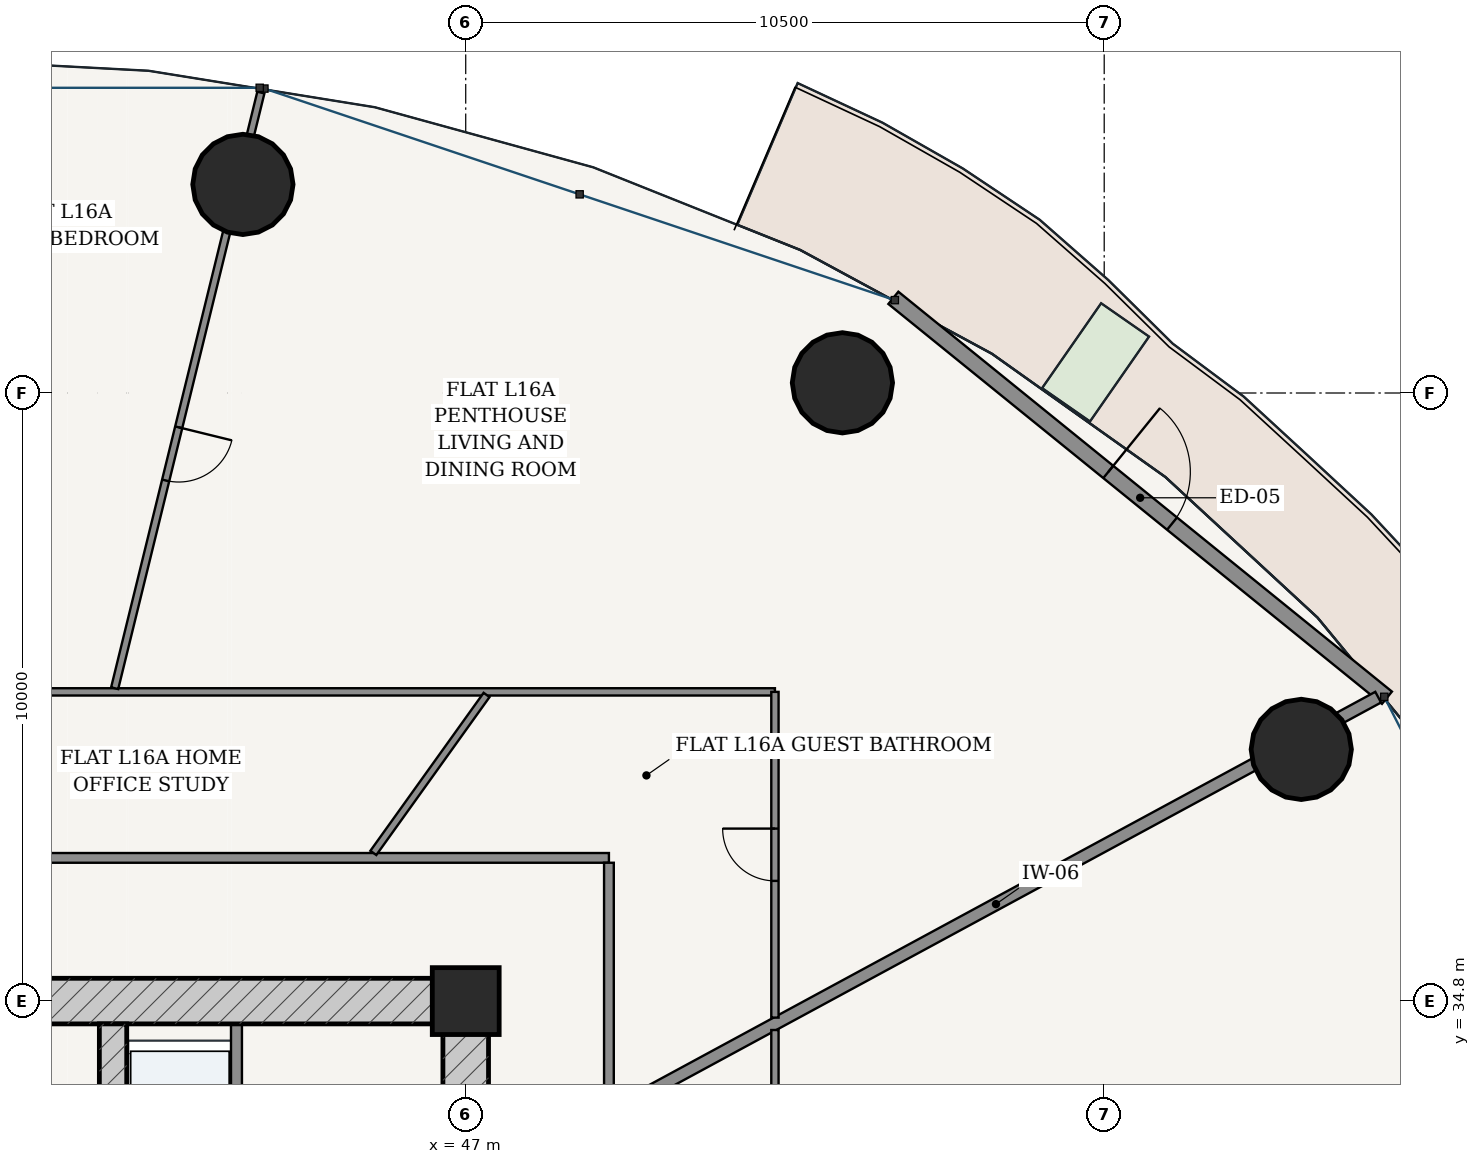
"""IFC4 building model, lengths in metres.
Left out: names, types, materials, properties, quantities, classifications, styles, units other than length and angle.
Written with IfcOpenShell. Run it as: python <this file> out.ifc"""

import sys

from ifc_helpers import new_model, si_unit, direction, frame, frame_2d, origin, origin_2d, place, context, subcontext, project, spatial, rectangle, hollow_circle, extrude, source, transform, mapped, element, fill, save


model = new_model("IFC4")
c1 = context("Model", 3, precision=1e-05, world=origin(), true_north=direction((-0.2419218956, 0.970295726276)))
c2 = subcontext(c1, "Body", "Model", "MODEL_VIEW")
j1 = project(units=[si_unit("LENGTHUNIT", "METRE"), si_unit("PLANEANGLEUNIT", "RADIAN")], contexts=[c1])
p1 = place(None, origin())
s1 = spatial("IfcSite", under=j1, at=p1, CompositionType="ELEMENT")
p2 = place(p1, origin())
s2 = spatial("IfcBuilding", under=s1, at=p2, CompositionType="ELEMENT")
p3 = place(p2, frame((0.0, 0.0, 63.6)))
s3 = spatial("IfcBuildingStorey", under=s2, at=p3, CompositionType="ELEMENT", Elevation=63.6)
p4 = place(p3, frame((47.0, 34.8, 0.0), z_axis=(0.0, 0.0, 1.0), x_axis=(1.0, 0.0, 0.0)))
e1 = element("IfcColumn", 1, at=p4, inside=s3, PredefinedType="COLUMN", context=c2, shape_type="SweptSolid", body=[
    extrude(rectangle(XDim=1.1, YDim=1.1, at=origin_2d()), origin(), (0.0, 0.0, 1.0), 3.6),
])
p5 = place(p3, frame((28.625, 34.8, 0.0), z_axis=(0.0, 0.0, 1.0), x_axis=(1.0, 0.0, 0.0)))
e2 = element("IfcWall", 2, at=p5, inside=s3, PredefinedType="SHEAR", context=c2, shape_type="SweptSolid", body=[
    extrude(rectangle(XDim=18.75, YDim=0.75, at=frame_2d((9.375, 0.0))), origin(), (0.0, 0.0, 1.0), 3.32),
])
p6 = place(p5, frame((8.95, 0.0, 0.0)))
e3 = element("IfcOpeningElement", 3, at=p6, cuts=e2, PredefinedType="OPENING", context=c2, shape_type="SweptSolid", body=[
    extrude(rectangle(XDim=0.85, YDim=2.1, at=frame_2d((0.425, 1.05))), frame((0.0, 0.385, 0.0), z_axis=(0.0, -1.0, 0.0), x_axis=(1.0, 0.0, 0.0)), (0.0, 0.0, 1.0), 0.77),
])
p7 = place(p3, frame((47.0, 19.175, 0.0), z_axis=(0.0, 0.0, 1.0), x_axis=(0.0, 1.0, 0.0)))
e4 = element("IfcWall", 4, at=p7, inside=s3, PredefinedType="SHEAR", context=c2, shape_type="SweptSolid", body=[
    extrude(rectangle(XDim=15.25, YDim=0.75, at=frame_2d((7.625, 0.0))), origin(), (0.0, 0.0, 1.0), 3.32),
])
p8 = place(p7, frame((9.875, 0.0, 0.0)))
e5 = element("IfcOpeningElement", 5, at=p8, cuts=e4, PredefinedType="OPENING", context=c2, shape_type="SweptSolid", body=[
    extrude(rectangle(XDim=1.5, YDim=2.2, at=frame_2d((0.75, 1.1))), frame((0.0, 0.385, 0.0), z_axis=(0.0, -1.0, 0.0), x_axis=(1.0, 0.0, 0.0)), (0.0, 0.0, 1.0), 0.77),
])
p9 = place(p3, frame((41.2, 19.175, 0.0), z_axis=(0.0, 0.0, 1.0), x_axis=(0.0, 1.0, 0.0)))
e6 = element("IfcWall", 6, at=p9, inside=s3, PredefinedType="SHEAR", context=c2, shape_type="SweptSolid", body=[
    extrude(rectangle(XDim=15.25, YDim=0.45, at=frame_2d((7.625, 0.0))), origin(), (0.0, 0.0, 1.0), 3.32),
])
p10 = place(p9, frame((7.8, 0.0, 0.0)))
e7 = element("IfcOpeningElement", 7, at=p10, cuts=e6, PredefinedType="OPENING", context=c2, shape_type="SweptSolid", body=[
    extrude(rectangle(XDim=1.05, YDim=2.15, at=frame_2d((0.525, 1.075))), frame((0.0, 0.235, 0.0), z_axis=(0.0, -1.0, 0.0), x_axis=(1.0, 0.0, 0.0)), (0.0, 0.0, 1.0), 0.47),
])
for number, where, z_axis, x_axis in (
    (8, (60.741, 38.939, 0.0), (0.0, 0.0, 1.0), (1.0, 0.0, 0.0)),
    (9, (53.195, 44.968, 0.0), (0.0, 0.0, 1.0), (1.0, 0.0, 0.0)),
    (10, (43.336, 48.23, 0.0), (0.0, 0.0, 1.0), (1.0, 0.0, 0.0)),
):
    element("IfcColumn", number, at=place(p3, frame(where, z_axis=z_axis, x_axis=x_axis)), inside=s3, PredefinedType="COLUMN", context=c2, shape_type="SweptSolid", body=[
        extrude(hollow_circle(Radius=0.825, WallThickness=0.05, at=origin_2d()), origin(), (0.0, 0.0, 1.0), 3.6),
    ])
p11 = place(p3, frame((62.15, 39.789, 0.0), z_axis=(0.0, 0.0, 1.0), x_axis=(-0.777005352078, 0.62949398952, 0.0)))
e11 = element("IfcWall", 11, at=p11, inside=s3, PredefinedType="SOLIDWALL", context=c2, shape_type="SweptSolid", body=[
    extrude(rectangle(XDim=10.447, YDim=0.26, at=frame_2d((5.223, 0.0))), origin(), (0.0, 0.0, 1.0), 3.32),
])
p12 = place(p11, frame((4.548, 0.0, 0.0)))
e12 = element("IfcOpeningElement", 12, at=p12, cuts=e11, PredefinedType="OPENING", context=c2, shape_type="SweptSolid", body=[
    extrude(rectangle(XDim=1.35, YDim=2.2, at=frame_2d((0.675, 1.1))), frame((0.0, 0.14, 0.0), z_axis=(0.0, -1.0, 0.0), x_axis=(1.0, 0.0, 0.0)), (0.0, 0.0, 1.0), 0.28),
])
p13 = place(p3, frame((43.23, 28.52, 0.0), z_axis=(0.0, 0.0, 1.0), x_axis=(0.0, 1.0, 0.0)))
e13 = element("IfcWall", 13, at=p13, inside=s3, PredefinedType="PARTITIONING", context=c2, shape_type="SweptSolid", body=[
    extrude(rectangle(XDim=5.905, YDim=0.18, at=frame_2d((2.953, 0.0))), origin(), (0.0, 0.0, 1.0), 3.32),
])
p14 = place(p13, frame((0.905, 0.0, 0.0)))
e14 = element("IfcOpeningElement", 14, at=p14, cuts=e13, PredefinedType="OPENING", context=c2, shape_type="SweptSolid", body=[
    extrude(rectangle(XDim=0.85, YDim=2.1, at=frame_2d((0.425, 1.05))), frame((0.0, 0.1, 0.0), z_axis=(0.0, -1.0, 0.0), x_axis=(1.0, 0.0, 0.0)), (0.0, 0.0, 1.0), 0.2),
])
p15 = place(p13, frame((3.655, 0.0, 0.0)))
e15 = element("IfcOpeningElement", 15, at=p15, cuts=e13, PredefinedType="OPENING", context=c2, shape_type="SweptSolid", body=[
    extrude(rectangle(XDim=1.15, YDim=2.2, at=frame_2d((0.575, 1.1))), frame((0.0, 0.1, 0.0), z_axis=(0.0, -1.0, 0.0), x_axis=(1.0, 0.0, 0.0)), (0.0, 0.0, 1.0), 0.2),
])
p16 = place(p3, frame((26.645, 37.155, 0.0), z_axis=(0.0, 0.0, 1.0), x_axis=(1.0, 0.0, 0.0)))
e16 = element("IfcWall", 16, at=p16, inside=s3, PredefinedType="PARTITIONING", context=c2, shape_type="SweptSolid", body=[
    extrude(rectangle(XDim=22.71, YDim=0.16, at=frame_2d((11.355, 0.0))), origin(), (0.0, 0.0, 1.0), 2.688),
])
p17 = place(p3, frame((49.355, 16.525, 0.0), z_axis=(0.0, 0.0, 1.0), x_axis=(0.0, 1.0, 0.0)))
e17 = element("IfcWall", 17, at=p17, inside=s3, PredefinedType="PARTITIONING", context=c2, shape_type="SweptSolid", body=[
    extrude(rectangle(XDim=20.55, YDim=0.16, at=frame_2d((10.275, 0.0))), origin(), (0.0, 0.0, 1.0), 2.688),
])
p18 = place(p17, frame((2.733, 0.0, 0.0)))
e18 = element("IfcOpeningElement", 18, at=p18, cuts=e17, PredefinedType="OPENING", context=c2, shape_type="SweptSolid", body=[
    extrude(rectangle(XDim=0.98, YDim=2.2, at=frame_2d((0.49, 1.1))), frame((0.0, 0.09, 0.0), z_axis=(0.0, -1.0, 0.0), x_axis=(1.0, 0.0, 0.0)), (0.0, 0.0, 1.0), 0.18),
])
p19 = place(p3, frame((49.435, 32.991, 0.0), z_axis=(0.0, 0.0, 1.0), x_axis=(0.879369737803, 0.476139542819, 0.0)))
e19 = element("IfcWall", 19, at=p19, inside=s3, PredefinedType="PARTITIONING", context=c2, shape_type="SweptSolid", body=[
    extrude(rectangle(XDim=14.295, YDim=0.2, at=frame_2d((7.147, 0.0))), origin(), (0.0, 0.0, 1.0), 2.688),
])
p20 = place(p3, frame((23.915, 39.885, 0.0), z_axis=(0.0, 0.0, 1.0), x_axis=(1.0, 0.0, 0.0)))
e20 = element("IfcWall", 20, at=p20, inside=s3, PredefinedType="PARTITIONING", context=c2, shape_type="SweptSolid", body=[
    extrude(rectangle(XDim=28.17, YDim=0.12, at=frame_2d((14.085, 0.0))), origin(), (0.0, 0.0, 1.0), 2.688),
])
p21 = place(p20, frame((12.891, 0.0, 0.0)))
e21 = element("IfcOpeningElement", 21, at=p21, cuts=e20, PredefinedType="OPENING", context=c2, shape_type="SweptSolid", body=[
    extrude(rectangle(XDim=0.9, YDim=2.15, at=frame_2d((0.45, 1.075))), frame((0.0, 0.07, 0.0), z_axis=(0.0, -1.0, 0.0), x_axis=(1.0, 0.0, 0.0)), (0.0, 0.0, 1.0), 0.14),
])
p22 = place(p3, frame((52.085, 39.885, 0.0), z_axis=(0.0, 0.0, 1.0), x_axis=(0.0, -1.0, 0.0)))
e22 = element("IfcWall", 22, at=p22, inside=s3, PredefinedType="PARTITIONING", context=c2, shape_type="SweptSolid", body=[
    extrude(rectangle(XDim=5.357, YDim=0.12, at=frame_2d((2.678, 0.0))), origin(), (0.0, 0.0, 1.0), 2.999),
])
p23 = place(p22, frame((2.248, 0.0, 0.0)))
e23 = element("IfcOpeningElement", 23, at=p23, cuts=e22, PredefinedType="OPENING", context=c2, shape_type="SweptSolid", body=[
    extrude(rectangle(XDim=0.86, YDim=2.15, at=frame_2d((0.43, 1.075))), frame((0.0, 0.07, 0.0), z_axis=(0.0, -1.0, 0.0), x_axis=(1.0, 0.0, 0.0)), (0.0, 0.0, 1.0), 0.14),
])
p24 = place(p3, frame((41.227, 39.945, 0.0), z_axis=(0.0, 0.0, 1.0), x_axis=(0.238375747469, 0.97117300365, 0.0)))
e24 = element("IfcWall", 24, at=p24, inside=s3, PredefinedType="PARTITIONING", context=c2, shape_type="SweptSolid", body=[
    extrude(rectangle(XDim=10.086, YDim=0.12, at=frame_2d((5.043, 0.0))), origin(), (0.0, 0.0, 1.0), 2.688),
])
p25 = place(p24, frame((3.518, 0.0, 0.0)))
e25 = element("IfcOpeningElement", 25, at=p25, cuts=e24, PredefinedType="OPENING", context=c2, shape_type="SweptSolid", body=[
    extrude(rectangle(XDim=0.9, YDim=2.15, at=frame_2d((0.45, 1.075))), frame((0.0, 0.07, 0.0), z_axis=(0.0, -1.0, 0.0), x_axis=(1.0, 0.0, 0.0)), (0.0, 0.0, 1.0), 0.14),
])
p26 = place(p3, frame((45.481, 37.237, 0.0), z_axis=(0.0, 0.0, 1.0), x_axis=(0.582530715463, 0.812808689387, 0.0)))
e26 = element("IfcWall", 26, at=p26, inside=s3, PredefinedType="PARTITIONING", context=c2, shape_type="SweptSolid", body=[
    extrude(rectangle(XDim=3.197, YDim=0.12, at=frame_2d((1.598, 0.0))), origin(), (0.0, 0.0, 1.0), 3.32),
])
p27 = place(p3, frame((52.085, 34.324, 0.0), z_axis=(0.0, 0.0, 1.0), x_axis=(0.0, -1.0, 0.0)))
e27 = element("IfcWall", 27, at=p27, inside=s3, PredefinedType="PARTITIONING", context=c2, shape_type="SweptSolid", body=[
    extrude(rectangle(XDim=20.609, YDim=0.12, at=frame_2d((10.305, 0.0))), origin(), (0.0, 0.0, 1.0), 2.688),
])
p28 = place(p27, frame((15.972, 0.0, 0.0)))
e28 = element("IfcOpeningElement", 28, at=p28, cuts=e27, PredefinedType="OPENING", context=c2, shape_type="SweptSolid", body=[
    extrude(rectangle(XDim=0.9, YDim=2.15, at=frame_2d((0.45, 1.075))), frame((0.0, 0.07, 0.0), z_axis=(0.0, -1.0, 0.0), x_axis=(1.0, 0.0, 0.0)), (0.0, 0.0, 1.0), 0.14),
])
p29 = place(p27, frame((3.058, 0.0, 0.0)))
e29 = element("IfcOpeningElement", 29, at=p29, cuts=e27, PredefinedType="OPENING", context=c2, shape_type="SweptSolid", body=[
    extrude(rectangle(XDim=0.9, YDim=2.15, at=frame_2d((0.45, 1.075))), frame((0.0, 0.07, 0.0), z_axis=(0.0, -1.0, 0.0), x_axis=(1.0, 0.0, 0.0)), (0.0, 0.0, 1.0), 0.14),
])
m1 = source(origin(), c2, "Body", "SweptSolid", [
    extrude(rectangle(XDim=1.35, YDim=2.2, at=frame_2d((0.675, 1.1))), frame((0.0, 0.025, 0.0), z_axis=(0.0, -1.0, 0.0), x_axis=(1.0, 0.0, 0.0)), (0.0, 0.0, 1.0), 0.05),
])
p30 = place(p12, frame((1.35, 0.0, 0.0), z_axis=(0.0, 0.0, 1.0), x_axis=(-1.0, 0.0, 0.0)))
e30 = element("IfcDoor", 30, at=p30, inside=s3, OperationType="SINGLE_SWING_LEFT", PredefinedType="DOOR", context=c2, shape_type="MappedRepresentation", body=[
    mapped(m1, transform((0.0, 0.0, 0.0), scale=1.0)),
])
fill(e12, e30)
m2 = source(origin(), c2, "Body", "SweptSolid", [
    extrude(rectangle(XDim=0.9, YDim=2.15, at=frame_2d((0.45, 1.075))), frame((0.0, 0.025, 0.0), z_axis=(0.0, -1.0, 0.0), x_axis=(1.0, 0.0, 0.0)), (0.0, 0.0, 1.0), 0.05),
])
p31 = place(p25, frame((0.9, 0.0, 0.0), z_axis=(0.0, 0.0, 1.0), x_axis=(-1.0, 0.0, 0.0)))
e31 = element("IfcDoor", 31, at=p31, inside=s3, OperationType="SINGLE_SWING_LEFT", PredefinedType="DOOR", context=c2, shape_type="MappedRepresentation", body=[
    mapped(m2, transform((0.0, 0.0, 0.0), scale=1.0)),
])
fill(e25, e31)
m3 = source(origin(), c2, "Body", "SweptSolid", [
    extrude(rectangle(XDim=0.86, YDim=2.15, at=frame_2d((0.43, 1.075))), frame((0.0, 0.025, 0.0), z_axis=(0.0, -1.0, 0.0), x_axis=(1.0, 0.0, 0.0)), (0.0, 0.0, 1.0), 0.05),
])
p32 = place(p23, frame((0.86, 0.0, 0.0), z_axis=(0.0, 0.0, 1.0), x_axis=(-1.0, 0.0, 0.0)))
e32 = element("IfcDoor", 32, at=p32, inside=s3, OperationType="SINGLE_SWING_RIGHT", PredefinedType="DOOR", context=c2, shape_type="MappedRepresentation", body=[
    mapped(m3, transform((0.0, 0.0, 0.0), scale=1.0)),
])
fill(e23, e32)
save(model, sys.argv[1])
